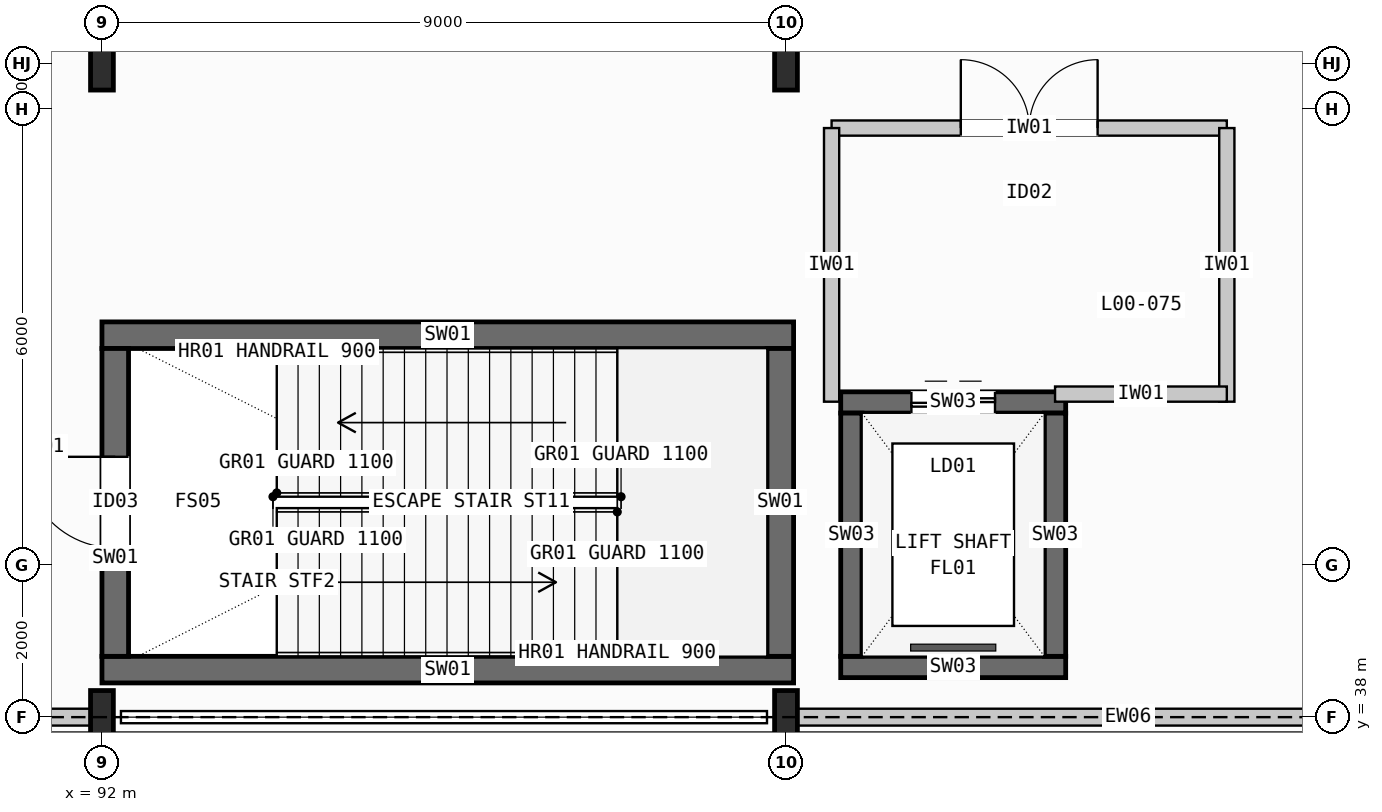
"""IFC4 building model, lengths in metres.
Left out: names, types, materials, properties, quantities, classifications, styles, units other than length and angle.
Written with IfcOpenShell. Run it as: python <this file> out.ifc"""

import sys

from ifc_helpers import new_model, si_unit, direction, frame, frame_2d, origin, origin_2d, place, context, subcontext, project, spatial, rectangle, i_section, extrude, element, fill, save


model = new_model("IFC4")
c1 = context("Model", 3, precision=1e-05, world=origin(), true_north=direction((0.0, 1.0)))
c2 = subcontext(c1, "Body", "Model", "MODEL_VIEW")
j1 = project(units=[si_unit("LENGTHUNIT", "METRE"), si_unit("PLANEANGLEUNIT", "RADIAN")], contexts=[c1])
p1 = place(None, origin())
s1 = spatial("IfcSite", under=j1, at=p1, CompositionType="ELEMENT")
p2 = place(p1, origin())
s2 = spatial("IfcBuilding", under=s1, at=p2, CompositionType="ELEMENT")
p3 = place(p2, origin())
s3 = spatial("IfcBuildingStorey", under=s2, at=p3, CompositionType="ELEMENT", Elevation=0.0)
for number, where, z_axis, x_axis in (
    (1, (92.0, 38.0, 0.0), (0.0, 0.0, 1.0), (1.0, 0.0, 0.0)),
    (2, (92.0, 46.6, 0.0), (0.0, 0.0, 1.0), (1.0, 0.0, 0.0)),
    (3, (101.0, 38.0, 0.0), (0.0, 0.0, 1.0), (1.0, 0.0, 0.0)),
    (4, (101.0, 46.6, 0.0), (0.0, 0.0, 1.0), (1.0, 0.0, 0.0)),
):
    element("IfcColumn", number, at=place(p3, frame(where, z_axis=z_axis, x_axis=x_axis)), inside=s3, PredefinedType="COLUMN", context=c2, shape_type="SweptSolid", body=[
        extrude(i_section(OverallWidth=0.3, OverallDepth=0.7, WebThickness=0.017, FlangeThickness=0.032, FilletRadius=0.027, at=origin_2d()), origin(), (0.0, 0.0, 1.0), 6.0),
    ])
for number, where, z_axis, x_axis in (
    (5, (92.0, 38.625, 0.0), (0.0, 0.0, 1.0), (1.0, 0.0, 0.0)),
    (6, (92.0, 43.025, 0.0), (0.0, 0.0, 1.0), (1.0, 0.0, 0.0)),
):
    element("IfcWall", number, at=place(p3, frame(where, z_axis=z_axis, x_axis=x_axis)), inside=s3, PredefinedType="SHEAR", context=c2, shape_type="SweptSolid", body=[
        extrude(rectangle(XDim=9.1, YDim=0.35, at=frame_2d((4.55, 0.0))), origin(), (0.0, 0.0, 1.0), 6.0),
    ])
p4 = place(p3, frame((92.175, 38.8, 0.0), z_axis=(0.0, 0.0, 1.0), x_axis=(0.0, 1.0, 0.0)))
e7 = element("IfcWall", 7, at=p4, inside=s3, PredefinedType="SHEAR", context=c2, shape_type="SweptSolid", body=[
    extrude(rectangle(XDim=4.05, YDim=0.35, at=frame_2d((2.025, 0.0))), origin(), (0.0, 0.0, 1.0), 6.0),
])
p5 = place(p4, frame((1.425, 0.0, 0.0)))
e8 = element("IfcOpeningElement", 8, at=p5, cuts=e7, PredefinedType="OPENING", context=c2, shape_type="SweptSolid", body=[
    extrude(rectangle(XDim=1.2, YDim=2.2, at=frame_2d((0.6, 1.1))), frame((0.0, 0.185, 0.0), z_axis=(0.0, -1.0, 0.0), x_axis=(1.0, 0.0, 0.0)), (0.0, 0.0, 1.0), 0.37),
])
p6 = place(p3, frame((100.925, 38.8, 0.0), z_axis=(0.0, 0.0, 1.0), x_axis=(0.0, 1.0, 0.0)))
e9 = element("IfcWall", 9, at=p6, inside=s3, PredefinedType="SHEAR", context=c2, shape_type="SweptSolid", body=[
    extrude(rectangle(XDim=4.05, YDim=0.35, at=frame_2d((2.025, 0.0))), origin(), (0.0, 0.0, 1.0), 6.0),
])
p7 = place(p3, frame((101.72, 38.66, 0.0), z_axis=(0.0, 0.0, 1.0), x_axis=(1.0, 0.0, 0.0)))
e10 = element("IfcWall", 10, at=p7, inside=s3, PredefinedType="SHEAR", context=c2, shape_type="SweptSolid", body=[
    extrude(rectangle(XDim=2.96, YDim=0.28, at=frame_2d((1.48, 0.0))), origin(), (0.0, 0.0, 1.0), 6.0),
])
p8 = place(p3, frame((101.72, 42.14, 0.0), z_axis=(0.0, 0.0, 1.0), x_axis=(1.0, 0.0, 0.0)))
e11 = element("IfcWall", 11, at=p8, inside=s3, PredefinedType="SHEAR", context=c2, shape_type="SweptSolid", body=[
    extrude(rectangle(XDim=2.96, YDim=0.28, at=frame_2d((1.48, 0.0))), origin(), (0.0, 0.0, 1.0), 6.0),
])
p9 = place(p8, frame((0.93, 0.0, 0.0)))
e12 = element("IfcOpeningElement", 12, at=p9, cuts=e11, PredefinedType="OPENING", context=c2, shape_type="SweptSolid", body=[
    extrude(rectangle(XDim=1.1, YDim=2.15, at=frame_2d((0.55, 1.075))), frame((0.0, 0.15, 0.0), z_axis=(0.0, -1.0, 0.0), x_axis=(1.0, 0.0, 0.0)), (0.0, 0.0, 1.0), 0.3),
])
for number, where, z_axis, x_axis in (
    (13, (101.86, 38.8, 0.0), (0.0, 0.0, 1.0), (0.0, 1.0, 0.0)),
    (14, (104.54, 38.8, 0.0), (0.0, 0.0, 1.0), (0.0, 1.0, 0.0)),
):
    element("IfcWall", number, at=place(p3, frame(where, z_axis=z_axis, x_axis=x_axis)), inside=s3, PredefinedType="SHEAR", context=c2, shape_type="SweptSolid", body=[
        extrude(rectangle(XDim=3.2, YDim=0.28, at=frame_2d((1.6, 0.0))), origin(), (0.0, 0.0, 1.0), 6.0),
    ])
p10 = place(p3, frame((83.746, 38.0, 0.0), z_axis=(0.0, 0.0, 1.0), x_axis=(1.0, 0.0, 0.0)))
e15 = element("IfcWall", 15, at=p10, inside=s3, PredefinedType="STANDARD", context=c2, shape_type="SweptSolid", body=[
    extrude(rectangle(XDim=8.108, YDim=0.222, at=frame_2d((4.054, 0.0))), origin(), (0.0, 0.0, 1.0), 5.098),
])
p11 = place(p3, frame((101.146, 38.0, 0.0), z_axis=(0.0, 0.0, 1.0), x_axis=(1.0, 0.0, 0.0)))
e16 = element("IfcWall", 16, at=p11, inside=s3, PredefinedType="STANDARD", context=c2, shape_type="SweptSolid", body=[
    extrude(rectangle(XDim=8.708, YDim=0.222, at=frame_2d((4.354, 0.0))), origin(), (0.0, 0.0, 1.0), 5.098),
])
p12 = place(p3, frame((101.6, 45.75, 0.0), z_axis=(0.0, 0.0, 1.0), x_axis=(1.0, 0.0, 0.0)))
e17 = element("IfcWall", 17, at=p12, inside=s3, PredefinedType="PARTITIONING", context=c2, shape_type="SweptSolid", body=[
    extrude(rectangle(XDim=5.2, YDim=0.2, at=frame_2d((2.6, 0.0))), origin(), (0.0, 0.0, 1.0), 4.0),
])
p13 = place(p12, frame((1.7, 0.0, 0.0)))
e18 = element("IfcOpeningElement", 18, at=p13, cuts=e17, PredefinedType="OPENING", context=c2, shape_type="SweptSolid", body=[
    extrude(rectangle(XDim=1.8, YDim=2.2, at=frame_2d((0.9, 1.1))), frame((0.0, 0.11, 0.0), z_axis=(0.0, -1.0, 0.0), x_axis=(1.0, 0.0, 0.0)), (0.0, 0.0, 1.0), 0.22),
])
for number, where, z_axis, x_axis in (
    (19, (101.6, 42.15, 0.0), (0.0, 0.0, 1.0), (0.0, 1.0, 0.0)),
    (20, (106.8, 42.15, 0.0), (0.0, 0.0, 1.0), (0.0, 1.0, 0.0)),
):
    element("IfcWall", number, at=place(p3, frame(where, z_axis=z_axis, x_axis=x_axis)), inside=s3, PredefinedType="PARTITIONING", context=c2, shape_type="SweptSolid", body=[
        extrude(rectangle(XDim=3.6, YDim=0.2, at=frame_2d((1.8, 0.0))), origin(), (0.0, 0.0, 1.0), 4.0),
    ])
p14 = place(p3, frame((104.54, 42.25, 0.0), z_axis=(0.0, 0.0, 1.0), x_axis=(1.0, 0.0, 0.0)))
e21 = element("IfcWall", 21, at=p14, inside=s3, PredefinedType="PARTITIONING", context=c2, shape_type="SweptSolid", body=[
    extrude(rectangle(XDim=2.26, YDim=0.2, at=frame_2d((1.13, 0.0))), origin(), (0.0, 0.0, 1.0), 4.0),
])
p15 = place(p5, origin())
e22 = element("IfcDoor", 22, at=p15, inside=s3, OperationType="SINGLE_SWING_RIGHT", PredefinedType="DOOR", context=c2, shape_type="SweptSolid", body=[
    extrude(rectangle(XDim=1.2, YDim=2.2, at=frame_2d((0.6, 1.1))), frame((0.0, 0.025, 0.0), z_axis=(0.0, -1.0, 0.0), x_axis=(1.0, 0.0, 0.0)), (0.0, 0.0, 1.0), 0.05),
])
fill(e8, e22)
p16 = place(p9, origin())
e23 = element("IfcDoor", 23, at=p16, inside=s3, OperationType="DOUBLE_DOOR_SLIDING", PredefinedType="DOOR", context=c2, shape_type="SweptSolid", body=[
    extrude(rectangle(XDim=1.1, YDim=2.15, at=frame_2d((0.55, 1.075))), frame((0.0, 0.025, 0.0), z_axis=(0.0, -1.0, 0.0), x_axis=(1.0, 0.0, 0.0)), (0.0, 0.0, 1.0), 0.05),
])
fill(e12, e23)
p17 = place(p13, origin())
e24 = element("IfcDoor", 24, at=p17, inside=s3, OperationType="DOUBLE_DOOR_SINGLE_SWING", PredefinedType="DOOR", context=c2, shape_type="SweptSolid", body=[
    extrude(rectangle(XDim=1.8, YDim=2.2, at=frame_2d((0.9, 1.1))), frame((0.0, 0.025, 0.0), z_axis=(0.0, -1.0, 0.0), x_axis=(1.0, 0.0, 0.0)), (0.0, 0.0, 1.0), 0.05),
])
fill(e18, e24)
save(model, sys.argv[1])
